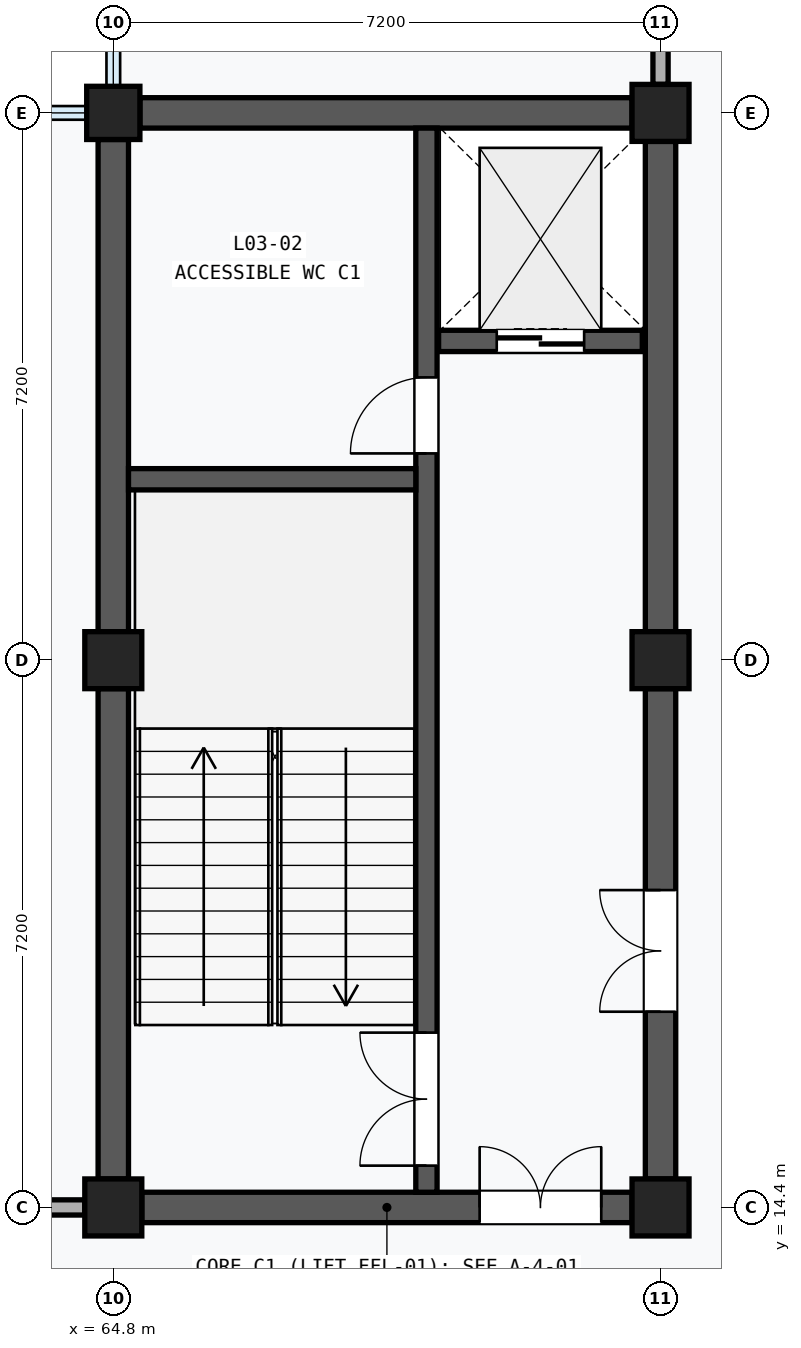
"""IFC4 building model, lengths in metres.
Left out: names, types, materials, properties, quantities, classifications, styles, units other than length and angle.
Written with IfcOpenShell. Run it as: python <this file> out.ifc"""

import sys

from ifc_helpers import new_model, si_unit, direction, frame, frame_2d, origin, origin_2d, place, context, subcontext, project, spatial, rectangle, extrude, element, fill, save


model = new_model("IFC4")
c1 = context("Model", 3, precision=1e-05, world=origin(), true_north=direction((0.0, 1.0)))
c2 = subcontext(c1, "Body", "Model", "MODEL_VIEW")
j1 = project(units=[si_unit("LENGTHUNIT", "METRE"), si_unit("PLANEANGLEUNIT", "RADIAN")], contexts=[c1])
p1 = place(None, origin())
s1 = spatial("IfcSite", under=j1, at=p1, CompositionType="ELEMENT")
p2 = place(p1, origin())
s2 = spatial("IfcBuilding", under=s1, at=p2, CompositionType="ELEMENT")
p3 = place(p2, frame((0.0, 0.0, 14.4)))
s3 = spatial("IfcBuildingStorey", under=s2, at=p3, CompositionType="ELEMENT", Elevation=14.4)
for number, where, z_axis, x_axis in (
    (1, (64.8, 14.4, 0.0), (0.0, 0.0, 1.0), (1.0, 0.0, 0.0)),
    (2, (64.8, 21.6, 0.0), (0.0, 0.0, 1.0), (1.0, 0.0, 0.0)),
):
    element("IfcColumn", number, at=place(p3, frame(where, z_axis=z_axis, x_axis=x_axis)), inside=s3, PredefinedType="COLUMN", context=c2, shape_type="SweptSolid", body=[
        extrude(rectangle(XDim=0.75, YDim=0.75, at=origin_2d()), origin(), (0.0, 0.0, 1.0), 4.2),
    ])
p4 = place(p3, frame((64.8, 28.8, 0.0), z_axis=(0.0, 0.0, 1.0), x_axis=(1.0, 0.0, 0.0)))
e3 = element("IfcColumn", 3, at=p4, inside=s3, PredefinedType="COLUMN", context=c2, shape_type="SweptSolid", body=[
    extrude(rectangle(XDim=0.7, YDim=0.7, at=origin_2d()), origin(), (0.0, 0.0, 1.0), 4.2),
])
for number, where, z_axis, x_axis in (
    (4, (72.0, 14.4, 0.0), (0.0, 0.0, 1.0), (1.0, 0.0, 0.0)),
    (5, (72.0, 21.6, 0.0), (0.0, 0.0, 1.0), (1.0, 0.0, 0.0)),
    (6, (72.0, 28.8, 0.0), (0.0, 0.0, 1.0), (1.0, 0.0, 0.0)),
):
    element("IfcColumn", number, at=place(p3, frame(where, z_axis=z_axis, x_axis=x_axis)), inside=s3, PredefinedType="COLUMN", context=c2, shape_type="SweptSolid", body=[
        extrude(rectangle(XDim=0.75, YDim=0.75, at=origin_2d()), origin(), (0.0, 0.0, 1.0), 4.2),
    ])
p5 = place(p3, frame((64.8, 14.775, 0.0), z_axis=(0.0, 0.0, 1.0), x_axis=(0.0, 1.0, 0.0)))
e7 = element("IfcWall", 7, at=p5, inside=s3, PredefinedType="SHEAR", context=c2, shape_type="SweptSolid", body=[
    extrude(rectangle(XDim=6.45, YDim=0.4, at=frame_2d((3.225, 0.0))), origin(), (0.0, 0.0, 1.0), 3.17),
])
p6 = place(p3, frame((64.8, 21.975, 0.0), z_axis=(0.0, 0.0, 1.0), x_axis=(0.0, 1.0, 0.0)))
e8 = element("IfcWall", 8, at=p6, inside=s3, PredefinedType="SHEAR", context=c2, shape_type="SweptSolid", body=[
    extrude(rectangle(XDim=6.475, YDim=0.4, at=frame_2d((3.237, 0.0))), origin(), (0.0, 0.0, 1.0), 3.17),
])
p7 = place(p3, frame((72.0, 14.775, 0.0), z_axis=(0.0, 0.0, 1.0), x_axis=(0.0, 1.0, 0.0)))
e9 = element("IfcWall", 9, at=p7, inside=s3, PredefinedType="SHEAR", context=c2, shape_type="SweptSolid", body=[
    extrude(rectangle(XDim=6.45, YDim=0.4, at=frame_2d((3.225, 0.0))), origin(), (0.0, 0.0, 1.0), 3.17),
])
p8 = place(p7, frame((2.2, 0.0, 0.0)))
e10 = element("IfcOpeningElement", 10, at=p8, cuts=e9, PredefinedType="OPENING", context=c2, shape_type="SweptSolid", body=[
    extrude(rectangle(XDim=1.6, YDim=2.2, at=frame_2d((0.8, 1.1))), frame((0.0, 0.212, 0.0), z_axis=(0.0, -1.0, 0.0), x_axis=(1.0, 0.0, 0.0)), (0.0, 0.0, 1.0), 0.424),
])
p9 = place(p3, frame((72.0, 21.975, 0.0), z_axis=(0.0, 0.0, 1.0), x_axis=(0.0, 1.0, 0.0)))
e11 = element("IfcWall", 11, at=p9, inside=s3, PredefinedType="SHEAR", context=c2, shape_type="SweptSolid", body=[
    extrude(rectangle(XDim=6.45, YDim=0.4, at=frame_2d((3.225, 0.0))), origin(), (0.0, 0.0, 1.0), 3.17),
])
p10 = place(p3, frame((65.175, 14.4, 0.0), z_axis=(0.0, 0.0, 1.0), x_axis=(1.0, 0.0, 0.0)))
e12 = element("IfcWall", 12, at=p10, inside=s3, PredefinedType="SHEAR", context=c2, shape_type="SweptSolid", body=[
    extrude(rectangle(XDim=6.45, YDim=0.4, at=frame_2d((3.225, 0.0))), origin(), (0.0, 0.0, 1.0), 3.17),
])
p11 = place(p10, frame((4.445, 0.0, 0.0)))
e13 = element("IfcOpeningElement", 13, at=p11, cuts=e12, PredefinedType="OPENING", context=c2, shape_type="SweptSolid", body=[
    extrude(rectangle(XDim=1.6, YDim=2.2, at=frame_2d((0.8, 1.1))), frame((0.0, 0.212, 0.0), z_axis=(0.0, -1.0, 0.0), x_axis=(1.0, 0.0, 0.0)), (0.0, 0.0, 1.0), 0.424),
])
p12 = place(p3, frame((65.15, 28.8, 0.0), z_axis=(0.0, 0.0, 1.0), x_axis=(1.0, 0.0, 0.0)))
e14 = element("IfcWall", 14, at=p12, inside=s3, PredefinedType="SHEAR", context=c2, shape_type="SweptSolid", body=[
    extrude(rectangle(XDim=6.475, YDim=0.4, at=frame_2d((3.238, 0.0))), origin(), (0.0, 0.0, 1.0), 3.17),
])
p13 = place(p3, frame((68.92, 14.6, 0.0), z_axis=(0.0, 0.0, 1.0), x_axis=(0.0, 1.0, 0.0)))
e15 = element("IfcWall", 15, at=p13, inside=s3, PredefinedType="SHEAR", context=c2, shape_type="SweptSolid", body=[
    extrude(rectangle(XDim=14.0, YDim=0.28, at=frame_2d((7.0, 0.0))), origin(), (0.0, 0.0, 1.0), 3.94),
])
p14 = place(p13, frame((0.35, 0.0, 0.0)))
e16 = element("IfcOpeningElement", 16, at=p14, cuts=e15, PredefinedType="OPENING", context=c2, shape_type="SweptSolid", body=[
    extrude(rectangle(XDim=1.75, YDim=2.15, at=frame_2d((0.875, 1.075))), frame((0.0, 0.152, 0.0), z_axis=(0.0, -1.0, 0.0), x_axis=(1.0, 0.0, 0.0)), (0.0, 0.0, 1.0), 0.304),
])
p15 = place(p13, frame((9.72, 0.0, 0.0)))
e17 = element("IfcOpeningElement", 17, at=p15, cuts=e15, PredefinedType="OPENING", context=c2, shape_type="SweptSolid", body=[
    extrude(rectangle(XDim=1.0, YDim=2.15, at=frame_2d((0.5, 1.075))), frame((0.0, 0.152, 0.0), z_axis=(0.0, -1.0, 0.0), x_axis=(1.0, 0.0, 0.0)), (0.0, 0.0, 1.0), 0.304),
])
p16 = place(p3, frame((65.0, 23.98, 0.0), z_axis=(0.0, 0.0, 1.0), x_axis=(1.0, 0.0, 0.0)))
e18 = element("IfcWall", 18, at=p16, inside=s3, PredefinedType="SHEAR", context=c2, shape_type="SweptSolid", body=[
    extrude(rectangle(XDim=3.78, YDim=0.28, at=frame_2d((1.89, 0.0))), origin(), (0.0, 0.0, 1.0), 3.94),
])
p17 = place(p3, frame((69.08, 25.8, 0.0), z_axis=(0.0, 0.0, 1.0), x_axis=(1.0, 0.0, 0.0)))
e19 = element("IfcWall", 19, at=p17, inside=s3, PredefinedType="SHEAR", context=c2, shape_type="SweptSolid", body=[
    extrude(rectangle(XDim=2.68, YDim=0.28, at=frame_2d((1.34, 0.0))), origin(), (0.0, 0.0, 1.0), 3.94),
])
p18 = place(p17, frame((0.765, 0.0, 0.0)))
e20 = element("IfcOpeningElement", 20, at=p18, cuts=e19, PredefinedType="OPENING", context=c2, shape_type="SweptSolid", body=[
    extrude(rectangle(XDim=1.15, YDim=2.2, at=frame_2d((0.575, 1.1))), frame((0.0, 0.152, 0.0), z_axis=(0.0, -1.0, 0.0), x_axis=(1.0, 0.0, 0.0)), (0.0, 0.0, 1.0), 0.304),
])
p19 = place(p3, frame((57.975, 14.4, 0.0), z_axis=(0.0, 0.0, 1.0), x_axis=(1.0, 0.0, 0.0)))
e21 = element("IfcWall", 21, at=p19, inside=s3, PredefinedType="PARTITIONING", context=c2, shape_type="SweptSolid", body=[
    extrude(rectangle(XDim=6.45, YDim=0.2, at=frame_2d((3.225, 0.0))), origin(), (0.0, 0.0, 1.0), 3.17),
])
p20 = place(p19, frame((2.585, 0.0, 0.0)))
e22 = element("IfcOpeningElement", 22, at=p20, cuts=e21, PredefinedType="OPENING", context=c2, shape_type="SweptSolid", body=[
    extrude(rectangle(XDim=1.28, YDim=2.28, at=frame_2d((0.64, 1.14))), frame((0.0, 0.112, 0.0), z_axis=(0.0, -1.0, 0.0), x_axis=(1.0, 0.0, 0.0)), (0.0, 0.0, 1.0), 0.224),
])
p21 = place(p3, frame((72.0, 29.175, 0.0), z_axis=(0.0, 0.0, 1.0), x_axis=(0.0, 1.0, 0.0)))
e23 = element("IfcWall", 23, at=p21, inside=s3, PredefinedType="PARTITIONING", context=c2, shape_type="SweptSolid", body=[
    extrude(rectangle(XDim=6.45, YDim=0.2, at=frame_2d((3.225, 0.0))), origin(), (0.0, 0.0, 1.0), 3.17),
])
p22 = place(p21, frame((2.645, 0.0, 0.0)))
e24 = element("IfcOpeningElement", 24, at=p22, cuts=e23, PredefinedType="OPENING", context=c2, shape_type="SweptSolid", body=[
    extrude(rectangle(XDim=1.16, YDim=2.22, at=frame_2d((0.58, 1.11))), frame((0.0, 0.112, 0.0), z_axis=(0.0, -1.0, 0.0), x_axis=(1.0, 0.0, 0.0)), (0.0, 0.0, 1.0), 0.224),
])
p23 = place(p8, origin())
e25 = element("IfcDoor", 25, at=p23, inside=s3, OperationType="DOUBLE_DOOR_SINGLE_SWING", PredefinedType="DOOR", context=c2, shape_type="SweptSolid", body=[
    extrude(rectangle(XDim=1.6, YDim=2.2, at=frame_2d((0.8, 1.1))), frame((0.0, 0.025, 0.0), z_axis=(0.0, -1.0, 0.0), x_axis=(1.0, 0.0, 0.0)), (0.0, 0.0, 1.0), 0.05),
])
fill(e10, e25)
p24 = place(p11, origin())
e26 = element("IfcDoor", 26, at=p24, inside=s3, OperationType="DOUBLE_DOOR_SINGLE_SWING", PredefinedType="DOOR", context=c2, shape_type="SweptSolid", body=[
    extrude(rectangle(XDim=1.6, YDim=2.2, at=frame_2d((0.8, 1.1))), frame((0.0, 0.025, 0.0), z_axis=(0.0, -1.0, 0.0), x_axis=(1.0, 0.0, 0.0)), (0.0, 0.0, 1.0), 0.05),
])
fill(e13, e26)
p25 = place(p14, origin())
e27 = element("IfcDoor", 27, at=p25, inside=s3, OperationType="DOUBLE_DOOR_SINGLE_SWING", PredefinedType="DOOR", context=c2, shape_type="SweptSolid", body=[
    extrude(rectangle(XDim=1.75, YDim=2.15, at=frame_2d((0.875, 1.075))), frame((0.0, 0.025, 0.0), z_axis=(0.0, -1.0, 0.0), x_axis=(1.0, 0.0, 0.0)), (0.0, 0.0, 1.0), 0.05),
])
fill(e16, e27)
p26 = place(p15, origin())
e28 = element("IfcDoor", 28, at=p26, inside=s3, OperationType="SINGLE_SWING_LEFT", PredefinedType="DOOR", context=c2, shape_type="SweptSolid", body=[
    extrude(rectangle(XDim=1.0, YDim=2.15, at=frame_2d((0.5, 1.075))), frame((0.0, 0.025, 0.0), z_axis=(0.0, -1.0, 0.0), x_axis=(1.0, 0.0, 0.0)), (0.0, 0.0, 1.0), 0.05),
])
fill(e17, e28)
p27 = place(p18, frame((1.15, 0.0, 0.0), z_axis=(0.0, 0.0, 1.0), x_axis=(-1.0, 0.0, 0.0)))
e29 = element("IfcDoor", 29, at=p27, inside=s3, OperationType="DOUBLE_DOOR_SLIDING", PredefinedType="DOOR", context=c2, shape_type="SweptSolid", body=[
    extrude(rectangle(XDim=1.15, YDim=2.2, at=frame_2d((0.575, 1.1))), frame((0.0, 0.025, 0.0), z_axis=(0.0, -1.0, 0.0), x_axis=(1.0, 0.0, 0.0)), (0.0, 0.0, 1.0), 0.05),
])
fill(e20, e29)
save(model, sys.argv[1])
